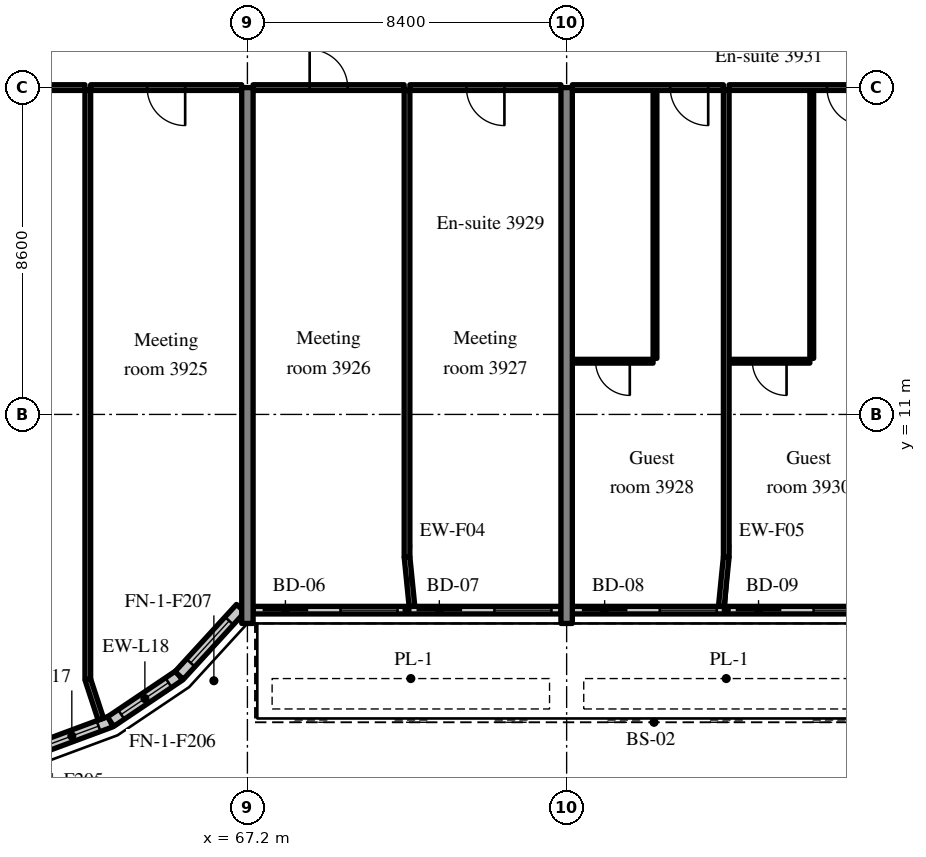
"""IFC4 building model, lengths in metres.
Left out: names, types, materials, properties, quantities, classifications, styles, units other than length and angle.
Written with IfcOpenShell. Run it as: python <this file> out.ifc"""

import sys

from ifc_helpers import new_model, si_unit, direction, frame, frame_2d, origin, place, context, subcontext, project, spatial, rectangle, extrude, source, transform, mapped, element, fill, save


model = new_model("IFC4")
c1 = context("Model", 3, precision=1e-05, world=origin(), true_north=direction((0.0, 1.0)))
c2 = subcontext(c1, "Body", "Model", "MODEL_VIEW")
j1 = project(units=[si_unit("LENGTHUNIT", "METRE"), si_unit("PLANEANGLEUNIT", "RADIAN")], contexts=[c1])
p1 = place(None, origin())
s1 = spatial("IfcSite", under=j1, at=p1, CompositionType="ELEMENT")
p2 = place(p1, origin())
s2 = spatial("IfcBuilding", under=s1, at=p2, CompositionType="ELEMENT")
p3 = place(p2, frame((0.0, 0.0, 163.0)))
s3 = spatial("IfcBuildingStorey", under=s2, at=p3, CompositionType="ELEMENT", Elevation=163.0)
m1 = source(origin(), c2, "Body", "SweptSolid", [
    extrude(rectangle(XDim=14.1, YDim=0.3, at=frame_2d((7.05, 0.0))), origin(), (0.0, 0.0, 1.0), 3.52),
])
for number, where, z_axis, x_axis in (
    (1, (67.2, 5.5, 0.0), (0.0, 0.0, 1.0), (0.0, 1.0, 0.0)),
    (2, (75.6, 5.5, 0.0), (0.0, 0.0, 1.0), (0.0, 1.0, 0.0)),
):
    element("IfcWall", number, at=place(p3, frame(where, z_axis=z_axis, x_axis=x_axis)), inside=s3, PredefinedType="SHEAR", context=c2, shape_type="MappedRepresentation", body=[
        mapped(m1, transform((0.0, 0.0, 0.0), scale=1.0)),
    ])
m2 = source(origin(), c2, "Body", "SweptSolid", [
    extrude(rectangle(XDim=2.176, YDim=0.3, at=frame_2d((1.088, 0.0))), origin(), (0.0, 0.0, 1.0), 3.52),
])
p4 = place(p3, frame((61.56, 2.16, 0.0), z_axis=(0.0, 0.0, 1.0), x_axis=(0.937531979054, 0.347899106424, 0.0)))
e3 = element("IfcWall", 3, at=p4, inside=s3, PredefinedType="SOLIDWALL", context=c2, shape_type="MappedRepresentation", body=[
    mapped(m2, transform((0.0, 0.0, 0.0), scale=1.0)),
])
m3 = source(origin(), c2, "Body", "SweptSolid", [
    extrude(rectangle(XDim=1.5, YDim=2.0, at=frame_2d((0.75, 1.0))), frame((0.0, 0.16, 0.0), z_axis=(0.0, -1.0, 0.0), x_axis=(1.0, 0.0, 0.0)), (0.0, 0.0, 1.0), 0.32),
])
p5 = place(p4, frame((0.338, 0.0, 0.9)))
e4 = element("IfcOpeningElement", 4, at=p5, cuts=e3, PredefinedType="OPENING", context=c2, shape_type="MappedRepresentation", body=[
    mapped(m3, transform((0.0, 0.0, 0.0), scale=1.0)),
])
m4 = source(origin(), c2, "Body", "SweptSolid", [
    extrude(rectangle(XDim=2.176, YDim=0.3, at=frame_2d((1.088, 0.0))), origin(), (0.0, 0.0, 1.0), 3.52),
])
p6 = place(p3, frame((63.599, 2.917, 0.0), z_axis=(0.0, 0.0, 1.0), x_axis=(0.829625727223, 0.558319937607, 0.0)))
e5 = element("IfcWall", 5, at=p6, inside=s3, PredefinedType="SOLIDWALL", context=c2, shape_type="MappedRepresentation", body=[
    mapped(m4, transform((0.0, 0.0, 0.0), scale=1.0)),
])
p7 = place(p6, frame((0.338, 0.0, 0.9)))
e6 = element("IfcOpeningElement", 6, at=p7, cuts=e5, PredefinedType="OPENING", context=c2, shape_type="MappedRepresentation", body=[
    mapped(m3, transform((0.0, 0.0, 0.0), scale=1.0)),
])
m5 = source(origin(), c2, "Body", "SweptSolid", [
    extrude(rectangle(XDim=2.398, YDim=0.3, at=frame_2d((1.199, 0.0))), origin(), (0.0, 0.0, 1.0), 3.52),
])
p8 = place(p3, frame((65.404, 4.131, 0.0), z_axis=(0.0, 0.0, 1.0), x_axis=(0.675374189419, 0.737475222815, 0.0)))
e7 = element("IfcWall", 7, at=p8, inside=s3, PredefinedType="SOLIDWALL", context=c2, shape_type="MappedRepresentation", body=[
    mapped(m5, transform((0.0, 0.0, 0.0), scale=1.0)),
])
p9 = place(p8, frame((0.449, 0.0, 0.9)))
e8 = element("IfcOpeningElement", 8, at=p9, cuts=e7, PredefinedType="OPENING", context=c2, shape_type="MappedRepresentation", body=[
    mapped(m3, transform((0.0, 0.0, 0.0), scale=1.0)),
])
m6 = source(origin(), c2, "Body", "SweptSolid", [
    extrude(rectangle(XDim=8.1, YDim=0.2, at=frame_2d((4.05, 0.0))), origin(), (0.0, 0.0, 1.0), 2.87),
])
p10 = place(p3, frame((67.35, 5.85, 0.0), z_axis=(0.0, 0.0, 1.0), x_axis=(1.0, 0.0, 0.0)))
e9 = element("IfcWall", 9, at=p10, inside=s3, PredefinedType="SOLIDWALL", context=c2, shape_type="MappedRepresentation", body=[
    mapped(m6, transform((0.0, 0.0, 0.0), scale=1.0)),
])
m7 = source(origin(), c2, "Body", "SweptSolid", [
    extrude(rectangle(XDim=1.2, YDim=2.4, at=frame_2d((0.6, 1.2))), frame((0.0, 0.11, 0.0), z_axis=(0.0, -1.0, 0.0), x_axis=(1.0, 0.0, 0.0)), (0.0, 0.0, 1.0), 0.22),
])
p11 = place(p10, frame((0.25, 0.0, 0.0)))
e10 = element("IfcOpeningElement", 10, at=p11, cuts=e9, PredefinedType="OPENING", context=c2, shape_type="MappedRepresentation", body=[
    mapped(m7, transform((0.0, 0.0, 0.0), scale=1.0)),
])
m8 = source(origin(), c2, "Body", "SweptSolid", [
    extrude(rectangle(XDim=1.5, YDim=1.5, at=frame_2d((0.75, 0.75))), frame((0.0, 0.11, 0.0), z_axis=(0.0, -1.0, 0.0), x_axis=(1.0, 0.0, 0.0)), (0.0, 0.0, 1.0), 0.22),
])
p12 = place(p10, frame((2.3, 0.0, 0.9)))
e11 = element("IfcOpeningElement", 11, at=p12, cuts=e9, PredefinedType="OPENING", context=c2, shape_type="MappedRepresentation", body=[
    mapped(m8, transform((0.0, 0.0, 0.0), scale=1.0)),
])
p13 = place(p10, frame((4.3, 0.0, 0.0)))
e12 = element("IfcOpeningElement", 12, at=p13, cuts=e9, PredefinedType="OPENING", context=c2, shape_type="MappedRepresentation", body=[
    mapped(m7, transform((0.0, 0.0, 0.0), scale=1.0)),
])
p14 = place(p10, frame((6.35, 0.0, 0.9)))
e13 = element("IfcOpeningElement", 13, at=p14, cuts=e9, PredefinedType="OPENING", context=c2, shape_type="MappedRepresentation", body=[
    mapped(m8, transform((0.0, 0.0, 0.0), scale=1.0)),
])
m9 = source(origin(), c2, "Body", "SweptSolid", [
    extrude(rectangle(XDim=8.1, YDim=0.2, at=frame_2d((4.05, 0.0))), origin(), (0.0, 0.0, 1.0), 2.87),
])
p15 = place(p3, frame((75.75, 5.85, 0.0), z_axis=(0.0, 0.0, 1.0), x_axis=(1.0, 0.0, 0.0)))
e14 = element("IfcWall", 14, at=p15, inside=s3, PredefinedType="SOLIDWALL", context=c2, shape_type="MappedRepresentation", body=[
    mapped(m9, transform((0.0, 0.0, 0.0), scale=1.0)),
])
p16 = place(p15, frame((0.25, 0.0, 0.0)))
e15 = element("IfcOpeningElement", 15, at=p16, cuts=e14, PredefinedType="OPENING", context=c2, shape_type="MappedRepresentation", body=[
    mapped(m7, transform((0.0, 0.0, 0.0), scale=1.0)),
])
p17 = place(p15, frame((2.3, 0.0, 0.9)))
e16 = element("IfcOpeningElement", 16, at=p17, cuts=e14, PredefinedType="OPENING", context=c2, shape_type="MappedRepresentation", body=[
    mapped(m8, transform((0.0, 0.0, 0.0), scale=1.0)),
])
p18 = place(p15, frame((4.3, 0.0, 0.0)))
e17 = element("IfcOpeningElement", 17, at=p18, cuts=e14, PredefinedType="OPENING", context=c2, shape_type="MappedRepresentation", body=[
    mapped(m7, transform((0.0, 0.0, 0.0), scale=1.0)),
])
p19 = place(p15, frame((6.35, 0.0, 0.9)))
e18 = element("IfcOpeningElement", 18, at=p19, cuts=e14, PredefinedType="OPENING", context=c2, shape_type="MappedRepresentation", body=[
    mapped(m8, transform((0.0, 0.0, 0.0), scale=1.0)),
])
m10 = source(origin(), c2, "Body", "SweptSolid", [
    extrude(rectangle(XDim=3.975, YDim=0.15, at=frame_2d((1.988, 0.0))), origin(), (0.0, 0.0, 1.0), 2.82),
])
p20 = place(p3, frame((58.95, 19.6, 0.0), z_axis=(0.0, 0.0, 1.0), x_axis=(1.0, 0.0, 0.0)))
e19 = element("IfcWall", 19, at=p20, inside=s3, PredefinedType="PARTITIONING", context=c2, shape_type="MappedRepresentation", body=[
    mapped(m10, transform((0.0, 0.0, 0.0), scale=1.0)),
])
m11 = source(origin(), c2, "Body", "SweptSolid", [
    extrude(rectangle(XDim=1.0, YDim=2.1, at=frame_2d((0.5, 1.05))), frame((0.0, 0.085, 0.0), z_axis=(0.0, -1.0, 0.0), x_axis=(1.0, 0.0, 0.0)), (0.0, 0.0, 1.0), 0.17),
])
p21 = place(p20, frame((1.487, 0.0, 0.0)))
e20 = element("IfcOpeningElement", 20, at=p21, cuts=e19, PredefinedType="OPENING", context=c2, shape_type="MappedRepresentation", body=[
    mapped(m11, transform((0.0, 0.0, 0.0), scale=1.0)),
])
p22 = place(p3, frame((63.075, 19.6, 0.0), z_axis=(0.0, 0.0, 1.0), x_axis=(1.0, 0.0, 0.0)))
e21 = element("IfcWall", 21, at=p22, inside=s3, PredefinedType="PARTITIONING", context=c2, shape_type="MappedRepresentation", body=[
    mapped(m10, transform((0.0, 0.0, 0.0), scale=1.0)),
])
p23 = place(p22, frame((1.487, 0.0, 0.0)))
e22 = element("IfcOpeningElement", 22, at=p23, cuts=e21, PredefinedType="OPENING", context=c2, shape_type="MappedRepresentation", body=[
    mapped(m11, transform((0.0, 0.0, 0.0), scale=1.0)),
])
m12 = source(origin(), c2, "Body", "SweptSolid", [
    extrude(rectangle(XDim=15.498, YDim=0.15, at=frame_2d((7.749, 0.0))), origin(), (0.0, 0.0, 1.0), 3.52),
])
p24 = place(p3, frame((63.0, 4.027, 0.0), z_axis=(0.0, 0.0, 1.0), x_axis=(0.0, 1.0, 0.0)))
e23 = element("IfcWall", 23, at=p24, inside=s3, PredefinedType="PARTITIONING", context=c2, shape_type="MappedRepresentation", body=[
    mapped(m12, transform((0.0, 0.0, 0.0), scale=1.0)),
])
m13 = source(origin(), c2, "Body", "SweptSolid", [
    extrude(rectangle(XDim=3.975, YDim=0.15, at=frame_2d((1.987, 0.0))), origin(), (0.0, 0.0, 1.0), 2.82),
])
p25 = place(p3, frame((67.35, 19.6, 0.0), z_axis=(0.0, 0.0, 1.0), x_axis=(1.0, 0.0, 0.0)))
e24 = element("IfcWall", 24, at=p25, inside=s3, PredefinedType="PARTITIONING", context=c2, shape_type="MappedRepresentation", body=[
    mapped(m13, transform((0.0, 0.0, 0.0), scale=1.0)),
])
p26 = place(p25, frame((1.488, 0.0, 0.0)))
e25 = element("IfcOpeningElement", 25, at=p26, cuts=e24, PredefinedType="OPENING", context=c2, shape_type="MappedRepresentation", body=[
    mapped(m11, transform((0.0, 0.0, 0.0), scale=1.0)),
])
p27 = place(p3, frame((71.475, 19.6, 0.0), z_axis=(0.0, 0.0, 1.0), x_axis=(1.0, 0.0, 0.0)))
e26 = element("IfcWall", 26, at=p27, inside=s3, PredefinedType="PARTITIONING", context=c2, shape_type="MappedRepresentation", body=[
    mapped(m13, transform((0.0, 0.0, 0.0), scale=1.0)),
])
p28 = place(p27, frame((1.488, 0.0, 0.0)))
e27 = element("IfcOpeningElement", 27, at=p28, cuts=e26, PredefinedType="OPENING", context=c2, shape_type="MappedRepresentation", body=[
    mapped(m11, transform((0.0, 0.0, 0.0), scale=1.0)),
])
m14 = source(origin(), c2, "Body", "SweptSolid", [
    extrude(rectangle(XDim=12.275, YDim=0.15, at=frame_2d((6.137, 0.0))), origin(), (0.0, 0.0, 1.0), 3.52),
])
p29 = place(p3, frame((71.4, 7.25, 0.0), z_axis=(0.0, 0.0, 1.0), x_axis=(0.0, 1.0, 0.0)))
e28 = element("IfcWall", 28, at=p29, inside=s3, PredefinedType="PARTITIONING", context=c2, shape_type="MappedRepresentation", body=[
    mapped(m14, transform((0.0, 0.0, 0.0), scale=1.0)),
])
m15 = source(origin(), c2, "Body", "SweptSolid", [
    extrude(rectangle(XDim=7.05, YDim=0.1, at=frame_2d((3.525, 0.0))), origin(), (0.0, 0.0, 1.0), 3.52),
])
p30 = place(p3, frame((77.925, 12.475, 0.0), z_axis=(0.0, 0.0, 1.0), x_axis=(0.0, 1.0, 0.0)))
e29 = element("IfcWall", 29, at=p30, inside=s3, PredefinedType="PARTITIONING", context=c2, shape_type="MappedRepresentation", body=[
    mapped(m15, transform((0.0, 0.0, 0.0), scale=1.0)),
])
m16 = source(origin(), c2, "Body", "SweptSolid", [
    extrude(rectangle(XDim=2.125, YDim=0.1, at=frame_2d((1.062, 0.0))), origin(), (0.0, 0.0, 1.0), 3.52),
])
p31 = place(p3, frame((75.75, 12.4, 0.0), z_axis=(0.0, 0.0, 1.0), x_axis=(1.0, 0.0, 0.0)))
e30 = element("IfcWall", 30, at=p31, inside=s3, PredefinedType="PARTITIONING", context=c2, shape_type="MappedRepresentation", body=[
    mapped(m16, transform((0.0, 0.0, 0.0), scale=1.0)),
])
m17 = source(origin(), c2, "Body", "SweptSolid", [
    extrude(rectangle(XDim=0.9, YDim=2.1, at=frame_2d((0.45, 1.05))), frame((0.0, 0.06, 0.0), z_axis=(0.0, -1.0, 0.0), x_axis=(1.0, 0.0, 0.0)), (0.0, 0.0, 1.0), 0.12),
])
p32 = place(p31, frame((0.612, 0.0, 0.0)))
e31 = element("IfcOpeningElement", 31, at=p32, cuts=e30, PredefinedType="OPENING", context=c2, shape_type="MappedRepresentation", body=[
    mapped(m17, transform((0.0, 0.0, 0.0), scale=1.0)),
])
p33 = place(p3, frame((75.75, 19.6, 0.0), z_axis=(0.0, 0.0, 1.0), x_axis=(1.0, 0.0, 0.0)))
e32 = element("IfcWall", 32, at=p33, inside=s3, PredefinedType="PARTITIONING", context=c2, shape_type="MappedRepresentation", body=[
    mapped(m10, transform((0.0, 0.0, 0.0), scale=1.0)),
])
p34 = place(p33, frame((2.575, 0.0, 0.0)))
e33 = element("IfcOpeningElement", 33, at=p34, cuts=e32, PredefinedType="OPENING", context=c2, shape_type="MappedRepresentation", body=[
    mapped(m11, transform((0.0, 0.0, 0.0), scale=1.0)),
])
p35 = place(p3, frame((82.05, 12.475, 0.0), z_axis=(0.0, 0.0, 1.0), x_axis=(0.0, 1.0, 0.0)))
e34 = element("IfcWall", 34, at=p35, inside=s3, PredefinedType="PARTITIONING", context=c2, shape_type="MappedRepresentation", body=[
    mapped(m15, transform((0.0, 0.0, 0.0), scale=1.0)),
])
p36 = place(p3, frame((79.875, 12.4, 0.0), z_axis=(0.0, 0.0, 1.0), x_axis=(1.0, 0.0, 0.0)))
e35 = element("IfcWall", 35, at=p36, inside=s3, PredefinedType="PARTITIONING", context=c2, shape_type="MappedRepresentation", body=[
    mapped(m16, transform((0.0, 0.0, 0.0), scale=1.0)),
])
p37 = place(p36, frame((0.612, 0.0, 0.0)))
e36 = element("IfcOpeningElement", 36, at=p37, cuts=e35, PredefinedType="OPENING", context=c2, shape_type="MappedRepresentation", body=[
    mapped(m17, transform((0.0, 0.0, 0.0), scale=1.0)),
])
p38 = place(p3, frame((79.875, 19.6, 0.0), z_axis=(0.0, 0.0, 1.0), x_axis=(1.0, 0.0, 0.0)))
e37 = element("IfcWall", 37, at=p38, inside=s3, PredefinedType="PARTITIONING", context=c2, shape_type="MappedRepresentation", body=[
    mapped(m10, transform((0.0, 0.0, 0.0), scale=1.0)),
])
p39 = place(p38, frame((2.575, 0.0, 0.0)))
e38 = element("IfcOpeningElement", 38, at=p39, cuts=e37, PredefinedType="OPENING", context=c2, shape_type="MappedRepresentation", body=[
    mapped(m11, transform((0.0, 0.0, 0.0), scale=1.0)),
])
p40 = place(p3, frame((79.8, 7.25, 0.0), z_axis=(0.0, 0.0, 1.0), x_axis=(0.0, 1.0, 0.0)))
e39 = element("IfcWall", 39, at=p40, inside=s3, PredefinedType="PARTITIONING", context=c2, shape_type="MappedRepresentation", body=[
    mapped(m14, transform((0.0, 0.0, 0.0), scale=1.0)),
])
m18 = source(origin(), c2, "Body", "SweptSolid", [
    extrude(rectangle(XDim=1.101, YDim=0.15, at=frame_2d((0.55, 0.0))), origin(), (0.0, 0.0, 1.0), 3.52),
])
p41 = place(p3, frame((63.343, 2.981, 0.0), z_axis=(0.0, 0.0, 1.0), x_axis=(-0.311567081539, 0.950224159712, 0.0)))
e40 = element("IfcWall", 40, at=p41, inside=s3, PredefinedType="PARTITIONING", context=c2, shape_type="MappedRepresentation", body=[
    mapped(m18, transform((0.0, 0.0, 0.0), scale=1.0)),
])
m19 = source(origin(), c2, "Body", "SweptSolid", [
    extrude(rectangle(XDim=1.307, YDim=0.15, at=frame_2d((0.653, 0.0))), origin(), (0.0, 0.0, 1.0), 3.52),
])
for number, where, z_axis, x_axis in (
    (41, (71.53, 5.95, 0.0), (0.0, 0.0, 1.0), (-0.1, 0.995, 0.0)),
    (42, (79.67, 5.95, 0.0), (0.0, 0.0, 1.0), (0.1, 0.995, 0.0)),
):
    element("IfcWall", number, at=place(p3, frame(where, z_axis=z_axis, x_axis=x_axis)), inside=s3, PredefinedType="PARTITIONING", context=c2, shape_type="MappedRepresentation", body=[
        mapped(m19, transform((0.0, 0.0, 0.0), scale=1.0)),
    ])
m20 = source(origin(), c2, "Body", "SweptSolid", [
    extrude(rectangle(XDim=1.5, YDim=2.0, at=frame_2d((0.75, 1.0))), frame((0.0, 0.03, 0.0), z_axis=(0.0, -1.0, 0.0), x_axis=(1.0, 0.0, 0.0)), (0.0, 0.0, 1.0), 0.06),
])
p42 = place(p5, origin())
e43 = element("IfcWindow", 43, at=p42, inside=s3, PartitioningType="SINGLE_PANEL", PredefinedType="WINDOW", context=c2, shape_type="MappedRepresentation", body=[
    mapped(m20, transform((0.0, 0.0, 0.0), scale=1.0)),
])
fill(e4, e43)
p43 = place(p7, origin())
e44 = element("IfcWindow", 44, at=p43, inside=s3, PartitioningType="SINGLE_PANEL", PredefinedType="WINDOW", context=c2, shape_type="MappedRepresentation", body=[
    mapped(m20, transform((0.0, 0.0, 0.0), scale=1.0)),
])
fill(e6, e44)
p44 = place(p9, origin())
e45 = element("IfcWindow", 45, at=p44, inside=s3, PartitioningType="SINGLE_PANEL", PredefinedType="WINDOW", context=c2, shape_type="MappedRepresentation", body=[
    mapped(m20, transform((0.0, 0.0, 0.0), scale=1.0)),
])
fill(e8, e45)
m21 = source(origin(), c2, "Body", "SweptSolid", [
    extrude(rectangle(XDim=1.2, YDim=2.4, at=frame_2d((0.6, 1.2))), frame((0.0, 0.025, 0.0), z_axis=(0.0, -1.0, 0.0), x_axis=(1.0, 0.0, 0.0)), (0.0, 0.0, 1.0), 0.05),
])
p45 = place(p11, origin())
e46 = element("IfcDoor", 46, at=p45, inside=s3, OperationType="SLIDING_TO_RIGHT", PredefinedType="DOOR", context=c2, shape_type="MappedRepresentation", body=[
    mapped(m21, transform((0.0, 0.0, 0.0), scale=1.0)),
])
fill(e10, e46)
m22 = source(origin(), c2, "Body", "SweptSolid", [
    extrude(rectangle(XDim=1.5, YDim=1.5, at=frame_2d((0.75, 0.75))), frame((0.0, 0.03, 0.0), z_axis=(0.0, -1.0, 0.0), x_axis=(1.0, 0.0, 0.0)), (0.0, 0.0, 1.0), 0.06),
])
p46 = place(p12, origin())
e47 = element("IfcWindow", 47, at=p46, inside=s3, PartitioningType="SINGLE_PANEL", PredefinedType="WINDOW", context=c2, shape_type="MappedRepresentation", body=[
    mapped(m22, transform((0.0, 0.0, 0.0), scale=1.0)),
])
fill(e11, e47)
p47 = place(p13, origin())
e48 = element("IfcDoor", 48, at=p47, inside=s3, OperationType="SLIDING_TO_LEFT", PredefinedType="DOOR", context=c2, shape_type="MappedRepresentation", body=[
    mapped(m21, transform((0.0, 0.0, 0.0), scale=1.0)),
])
fill(e12, e48)
p48 = place(p14, origin())
e49 = element("IfcWindow", 49, at=p48, inside=s3, PartitioningType="SINGLE_PANEL", PredefinedType="WINDOW", context=c2, shape_type="MappedRepresentation", body=[
    mapped(m22, transform((0.0, 0.0, 0.0), scale=1.0)),
])
fill(e13, e49)
p49 = place(p16, origin())
e50 = element("IfcDoor", 50, at=p49, inside=s3, OperationType="SLIDING_TO_RIGHT", PredefinedType="DOOR", context=c2, shape_type="MappedRepresentation", body=[
    mapped(m21, transform((0.0, 0.0, 0.0), scale=1.0)),
])
fill(e15, e50)
p50 = place(p17, origin())
e51 = element("IfcWindow", 51, at=p50, inside=s3, PartitioningType="SINGLE_PANEL", PredefinedType="WINDOW", context=c2, shape_type="MappedRepresentation", body=[
    mapped(m22, transform((0.0, 0.0, 0.0), scale=1.0)),
])
fill(e16, e51)
p51 = place(p18, origin())
e52 = element("IfcDoor", 52, at=p51, inside=s3, OperationType="SLIDING_TO_LEFT", PredefinedType="DOOR", context=c2, shape_type="MappedRepresentation", body=[
    mapped(m21, transform((0.0, 0.0, 0.0), scale=1.0)),
])
fill(e17, e52)
p52 = place(p19, origin())
e53 = element("IfcWindow", 53, at=p52, inside=s3, PartitioningType="SINGLE_PANEL", PredefinedType="WINDOW", context=c2, shape_type="MappedRepresentation", body=[
    mapped(m22, transform((0.0, 0.0, 0.0), scale=1.0)),
])
fill(e18, e53)
m23 = source(origin(), c2, "Body", "SweptSolid", [
    extrude(rectangle(XDim=1.0, YDim=2.1, at=frame_2d((0.5, 1.05))), frame((0.0, 0.025, 0.0), z_axis=(0.0, -1.0, 0.0), x_axis=(1.0, 0.0, 0.0)), (0.0, 0.0, 1.0), 0.05),
])
p53 = place(p23, origin())
e54 = element("IfcDoor", 54, at=p53, inside=s3, OperationType="SINGLE_SWING_RIGHT", PredefinedType="DOOR", context=c2, shape_type="MappedRepresentation", body=[
    mapped(m23, transform((0.0, 0.0, 0.0), scale=1.0)),
])
fill(e22, e54)
p54 = place(p26, origin())
e55 = element("IfcDoor", 55, at=p54, inside=s3, OperationType="SINGLE_SWING_LEFT", PredefinedType="DOOR", context=c2, shape_type="MappedRepresentation", body=[
    mapped(m23, transform((0.0, 0.0, 0.0), scale=1.0)),
])
fill(e25, e55)
p55 = place(p28, origin())
e56 = element("IfcDoor", 56, at=p55, inside=s3, OperationType="SINGLE_SWING_RIGHT", PredefinedType="DOOR", context=c2, shape_type="MappedRepresentation", body=[
    mapped(m23, transform((0.0, 0.0, 0.0), scale=1.0)),
])
fill(e27, e56)
m24 = source(origin(), c2, "Body", "SweptSolid", [
    extrude(rectangle(XDim=0.9, YDim=2.1, at=frame_2d((0.45, 1.05))), frame((0.0, 0.025, 0.0), z_axis=(0.0, -1.0, 0.0), x_axis=(1.0, 0.0, 0.0)), (0.0, 0.0, 1.0), 0.05),
])
p56 = place(p32, origin())
e57 = element("IfcDoor", 57, at=p56, inside=s3, OperationType="SINGLE_SWING_RIGHT", PredefinedType="DOOR", context=c2, shape_type="MappedRepresentation", body=[
    mapped(m24, transform((0.0, 0.0, 0.0), scale=1.0)),
])
fill(e31, e57)
p57 = place(p34, origin())
e58 = element("IfcDoor", 58, at=p57, inside=s3, OperationType="SINGLE_SWING_RIGHT", PredefinedType="DOOR", context=c2, shape_type="MappedRepresentation", body=[
    mapped(m23, transform((0.0, 0.0, 0.0), scale=1.0)),
])
fill(e33, e58)
p58 = place(p37, origin())
e59 = element("IfcDoor", 59, at=p58, inside=s3, OperationType="SINGLE_SWING_RIGHT", PredefinedType="DOOR", context=c2, shape_type="MappedRepresentation", body=[
    mapped(m24, transform((0.0, 0.0, 0.0), scale=1.0)),
])
fill(e36, e59)
p59 = place(p39, origin())
e60 = element("IfcDoor", 60, at=p59, inside=s3, OperationType="SINGLE_SWING_RIGHT", PredefinedType="DOOR", context=c2, shape_type="MappedRepresentation", body=[
    mapped(m23, transform((0.0, 0.0, 0.0), scale=1.0)),
])
fill(e38, e60)
save(model, sys.argv[1])
